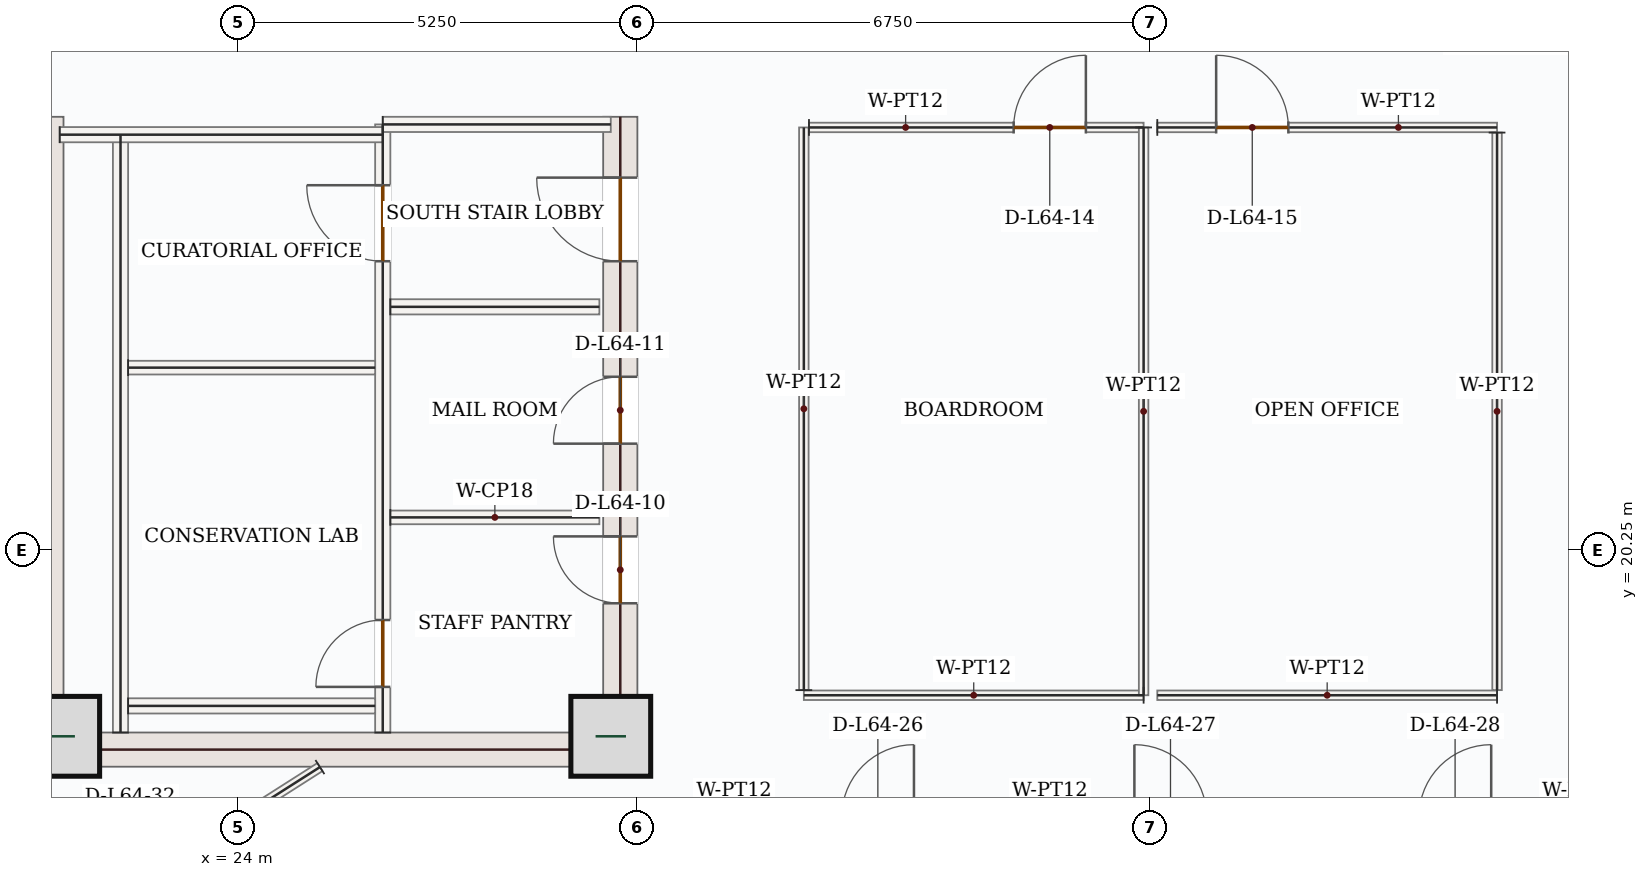
"""IFC4 building model, lengths in metres.
Left out: names, types, materials, properties, quantities, classifications, styles, units other than length and angle.
Written with IfcOpenShell. Run it as: python <this file> out.ifc"""

import sys

from ifc_helpers import new_model, si_unit, direction, frame, frame_2d, origin, origin_2d, place, context, subcontext, project, spatial, rectangle, extrude, source, transform, mapped, element, fill, save


model = new_model("IFC4")
c1 = context("Model", 3, precision=1e-05, world=origin(), true_north=direction((0.0, 1.0)))
c2 = subcontext(c1, "Body", "Model", "MODEL_VIEW")
j1 = project(units=[si_unit("LENGTHUNIT", "METRE"), si_unit("PLANEANGLEUNIT", "RADIAN")], contexts=[c1])
p1 = place(None, origin())
s1 = spatial("IfcSite", under=j1, at=p1, CompositionType="ELEMENT")
p2 = place(p1, origin())
s2 = spatial("IfcBuilding", under=s1, at=p2, CompositionType="ELEMENT")
p3 = place(p2, frame((0.0, 0.0, 269.1)))
s3 = spatial("IfcBuildingStorey", under=s2, at=p3, CompositionType="ELEMENT", Elevation=269.1)
m1 = source(origin(), c2, "Body", "SweptSolid", [
    extrude(rectangle(XDim=8.55, YDim=0.45, at=frame_2d((4.275, 0.0))), origin(), (0.0, 0.0, 1.0), 3.5),
])
p4 = place(p3, frame((21.475, 17.4, 0.0), z_axis=(0.0, 0.0, 1.0), x_axis=(0.0, 1.0, 0.0)))
e1 = element("IfcWall", 1, at=p4, inside=s3, PredefinedType="SHEAR", context=c2, shape_type="MappedRepresentation", body=[
    mapped(m1, transform((0.0, 0.0, 0.0), x_axis=(1.0, 0.0, 0.0), y_axis=(0.0, 1.0, 0.0), z_axis=(0.0, 0.0, 1.0), scale=1.0)),
])
p5 = place(p3, frame((29.025, 17.4, 0.0), z_axis=(0.0, 0.0, 1.0), x_axis=(0.0, 1.0, 0.0)))
e2 = element("IfcWall", 2, at=p5, inside=s3, PredefinedType="SHEAR", context=c2, shape_type="SweptSolid", body=[
    extrude(rectangle(XDim=8.55, YDim=0.45, at=frame_2d((4.275, 0.0))), origin(), (0.0, 0.0, 1.0), 3.5),
])
p6 = place(p5, frame((6.65, 0.0, 0.0)))
e3 = element("IfcOpeningElement", 3, at=p6, cuts=e2, PredefinedType="OPENING", context=c2, shape_type="SweptSolid", body=[
    extrude(rectangle(XDim=1.1, YDim=2.2, at=frame_2d((0.55, 1.1))), frame((0.0, 0.235, 0.0), z_axis=(0.0, -1.0, 0.0), x_axis=(1.0, 0.0, 0.0)), (0.0, 0.0, 1.0), 0.47),
])
p7 = place(p5, frame((2.15, 0.0, 0.0)))
e4 = element("IfcOpeningElement", 4, at=p7, cuts=e2, PredefinedType="OPENING", context=c2, shape_type="SweptSolid", body=[
    extrude(rectangle(XDim=0.88, YDim=2.1, at=frame_2d((0.44, 1.05))), frame((0.0, 0.235, 0.0), z_axis=(0.0, -1.0, 0.0), x_axis=(1.0, 0.0, 0.0)), (0.0, 0.0, 1.0), 0.47),
])
p8 = place(p5, frame((4.25, 0.0, 0.0)))
e5 = element("IfcOpeningElement", 5, at=p8, cuts=e2, PredefinedType="OPENING", context=c2, shape_type="SweptSolid", body=[
    extrude(rectangle(XDim=0.88, YDim=2.1, at=frame_2d((0.44, 1.05))), frame((0.0, 0.235, 0.0), z_axis=(0.0, -1.0, 0.0), x_axis=(1.0, 0.0, 0.0)), (0.0, 0.0, 1.0), 0.47),
])
m2 = source(origin(), c2, "Body", "SweptSolid", [
    extrude(rectangle(XDim=7.1, YDim=0.45, at=frame_2d((3.55, 0.0))), origin(), (0.0, 0.0, 1.0), 3.5),
])
p9 = place(p3, frame((21.7, 17.625, 0.0), z_axis=(0.0, 0.0, 1.0), x_axis=(1.0, 0.0, 0.0)))
e6 = element("IfcWall", 6, at=p9, inside=s3, PredefinedType="SHEAR", context=c2, shape_type="MappedRepresentation", body=[
    mapped(m2, transform((0.0, 0.0, 0.0), x_axis=(1.0, 0.0, 0.0), y_axis=(0.0, 1.0, 0.0), z_axis=(0.0, 0.0, 1.0), scale=1.0)),
])
m3 = source(origin(), c2, "Body", "SweptSolid", [
    extrude(rectangle(XDim=1.05, YDim=1.05, at=origin_2d()), origin(), (0.0, 0.0, 1.0), 3.75),
])
for number, where, z_axis, x_axis in (
    (7, (21.65, 17.8, 0.0), (0.0, 0.0, 1.0), (1.0, 0.0, 0.0)),
    (8, (28.9, 17.8, 0.0), (0.0, 0.0, 1.0), (1.0, 0.0, 0.0)),
):
    element("IfcColumn", number, at=place(p3, frame(where, z_axis=z_axis, x_axis=x_axis)), inside=s3, PredefinedType="COLUMN", context=c2, shape_type="MappedRepresentation", body=[
        mapped(m3, transform((0.0, 0.0, 0.0), x_axis=(1.0, 0.0, 0.0), y_axis=(0.0, 1.0, 0.0), z_axis=(0.0, 0.0, 1.0), scale=1.0)),
    ])
m4 = source(origin(), c2, "Body", "SweptSolid", [
    extrude(rectangle(XDim=7.87, YDim=0.2, at=frame_2d((3.935, 0.0))), origin(), (0.0, 0.0, 1.0), 3.5),
])
p10 = place(p3, frame((22.45, 17.85, 0.0), z_axis=(0.0, 0.0, 1.0), x_axis=(0.0, 1.0, 0.0)))
e9 = element("IfcWall", 9, at=p10, inside=s3, PredefinedType="SOLIDWALL", context=c2, shape_type="MappedRepresentation", body=[
    mapped(m4, transform((0.0, 0.0, 0.0), x_axis=(1.0, 0.0, 0.0), y_axis=(0.0, 1.0, 0.0), z_axis=(0.0, 0.0, 1.0), scale=1.0)),
])
p11 = place(p3, frame((25.9, 17.85, 0.0), z_axis=(0.0, 0.0, 1.0), x_axis=(0.0, 1.0, 0.0)))
e10 = element("IfcWall", 10, at=p11, inside=s3, PredefinedType="SOLIDWALL", context=c2, shape_type="SweptSolid", body=[
    extrude(rectangle(XDim=8.0, YDim=0.2, at=frame_2d((4.0, 0.0))), origin(), (0.0, 0.0, 1.0), 3.5),
])
p12 = place(p11, frame((6.2, 0.0, 0.0)))
e11 = element("IfcOpeningElement", 11, at=p12, cuts=e10, PredefinedType="OPENING", context=c2, shape_type="SweptSolid", body=[
    extrude(rectangle(XDim=1.0, YDim=2.15, at=frame_2d((0.5, 1.075))), frame((0.0, 0.11, 0.0), z_axis=(0.0, -1.0, 0.0), x_axis=(1.0, 0.0, 0.0)), (0.0, 0.0, 1.0), 0.22),
])
p13 = place(p11, frame((0.6, 0.0, 0.0)))
e12 = element("IfcOpeningElement", 12, at=p13, cuts=e10, PredefinedType="OPENING", context=c2, shape_type="SweptSolid", body=[
    extrude(rectangle(XDim=0.88, YDim=2.1, at=frame_2d((0.44, 1.05))), frame((0.0, 0.11, 0.0), z_axis=(0.0, -1.0, 0.0), x_axis=(1.0, 0.0, 0.0)), (0.0, 0.0, 1.0), 0.22),
])
m5 = source(origin(), c2, "Body", "SweptSolid", [
    extrude(rectangle(XDim=4.25, YDim=0.2, at=frame_2d((2.125, 0.0))), origin(), (0.0, 0.0, 1.0), 3.5),
])
p14 = place(p3, frame((21.65, 25.715, 0.0), z_axis=(0.0, 0.0, 1.0), x_axis=(1.0, 0.0, 0.0)))
e13 = element("IfcWall", 13, at=p14, inside=s3, PredefinedType="SOLIDWALL", context=c2, shape_type="MappedRepresentation", body=[
    mapped(m5, transform((0.0, 0.0, 0.0), x_axis=(1.0, 0.0, 0.0), y_axis=(0.0, 1.0, 0.0), z_axis=(0.0, 0.0, 1.0), scale=1.0)),
])
m6 = source(origin(), c2, "Body", "SweptSolid", [
    extrude(rectangle(XDim=3.0, YDim=0.2, at=frame_2d((1.5, 0.0))), origin(), (0.0, 0.0, 1.0), 3.5),
])
p15 = place(p3, frame((25.9, 25.85, 0.0), z_axis=(0.0, 0.0, 1.0), x_axis=(1.0, 0.0, 0.0)))
e14 = element("IfcWall", 14, at=p15, inside=s3, PredefinedType="SOLIDWALL", context=c2, shape_type="MappedRepresentation", body=[
    mapped(m6, transform((0.0, 0.0, 0.0), x_axis=(1.0, 0.0, 0.0), y_axis=(0.0, 1.0, 0.0), z_axis=(0.0, 0.0, 1.0), scale=1.0)),
])
m7 = source(origin(), c2, "Body", "SweptSolid", [
    extrude(rectangle(XDim=3.25, YDim=0.2, at=frame_2d((1.625, 0.0))), origin(), (0.0, 0.0, 1.0), 3.5),
])
p16 = place(p3, frame((22.55, 18.2, 0.0), z_axis=(0.0, 0.0, 1.0), x_axis=(1.0, 0.0, 0.0)))
e15 = element("IfcWall", 15, at=p16, inside=s3, PredefinedType="SOLIDWALL", context=c2, shape_type="MappedRepresentation", body=[
    mapped(m7, transform((0.0, 0.0, 0.0), x_axis=(1.0, 0.0, 0.0), y_axis=(0.0, 1.0, 0.0), z_axis=(0.0, 0.0, 1.0), scale=1.0)),
])
m8 = source(origin(), c2, "Body", "SweptSolid", [
    extrude(rectangle(XDim=3.25, YDim=0.18, at=frame_2d((1.625, 0.0))), origin(), (0.0, 0.0, 1.0), 3.5),
])
p17 = place(p3, frame((22.55, 22.65, 0.0), z_axis=(0.0, 0.0, 1.0), x_axis=(1.0, 0.0, 0.0)))
e16 = element("IfcWall", 16, at=p17, inside=s3, PredefinedType="PARTITIONING", context=c2, shape_type="MappedRepresentation", body=[
    mapped(m8, transform((0.0, 0.0, 0.0), x_axis=(1.0, 0.0, 0.0), y_axis=(0.0, 1.0, 0.0), z_axis=(0.0, 0.0, 1.0), scale=1.0)),
])
m9 = source(origin(), c2, "Body", "SweptSolid", [
    extrude(rectangle(XDim=2.75, YDim=0.2, at=frame_2d((1.375, 0.0))), origin(), (0.0, 0.0, 1.0), 3.5),
])
p18 = place(p3, frame((26.0, 23.45, 0.0), z_axis=(0.0, 0.0, 1.0), x_axis=(1.0, 0.0, 0.0)))
e17 = element("IfcWall", 17, at=p18, inside=s3, PredefinedType="SOLIDWALL", context=c2, shape_type="MappedRepresentation", body=[
    mapped(m9, transform((0.0, 0.0, 0.0), x_axis=(1.0, 0.0, 0.0), y_axis=(0.0, 1.0, 0.0), z_axis=(0.0, 0.0, 1.0), scale=1.0)),
])
m10 = source(origin(), c2, "Body", "SweptSolid", [
    extrude(rectangle(XDim=2.75, YDim=0.18, at=frame_2d((1.375, 0.0))), origin(), (0.0, 0.0, 1.0), 3.5),
])
p19 = place(p3, frame((26.0, 20.68, 0.0), z_axis=(0.0, 0.0, 1.0), x_axis=(1.0, 0.0, 0.0)))
e18 = element("IfcWall", 18, at=p19, inside=s3, PredefinedType="PARTITIONING", context=c2, shape_type="MappedRepresentation", body=[
    mapped(m10, transform((0.0, 0.0, 0.0), x_axis=(1.0, 0.0, 0.0), y_axis=(0.0, 1.0, 0.0), z_axis=(0.0, 0.0, 1.0), scale=1.0)),
])
p20 = place(p3, frame((25.073, 17.395, 0.0), z_axis=(0.0, 0.0, 1.0), x_axis=(-0.843398332862, -0.537288797693, 0.0)))
e19 = element("IfcWall", 19, at=p20, inside=s3, PredefinedType="PARTITIONING", context=c2, shape_type="SweptSolid", body=[
    extrude(rectangle(XDim=5.924, YDim=0.125, at=frame_2d((2.962, 0.0))), origin(), (0.0, 0.0, 1.0), 3.5),
])
p21 = place(p20, frame((2.487, 0.0, 0.0)))
e20 = element("IfcOpeningElement", 20, at=p21, cuts=e19, PredefinedType="OPENING", context=c2, shape_type="SweptSolid", body=[
    extrude(rectangle(XDim=0.95, YDim=2.15, at=frame_2d((0.475, 1.075))), frame((0.0, 0.073, 0.0), z_axis=(0.0, -1.0, 0.0), x_axis=(1.0, 0.0, 0.0)), (0.0, 0.0, 1.0), 0.145),
])
m11 = source(origin(), c2, "Body", "SweptSolid", [
    extrude(rectangle(XDim=4.47, YDim=0.125, at=frame_2d((2.235, 0.0))), origin(), (0.0, 0.0, 1.0), 3.5),
])
p22 = place(p3, frame((35.91, 18.34, 0.0), z_axis=(0.0, 0.0, 1.0), x_axis=(-1.0, 0.0, 0.0)))
e21 = element("IfcWall", 21, at=p22, inside=s3, PredefinedType="PARTITIONING", context=c2, shape_type="MappedRepresentation", body=[
    mapped(m11, transform((0.0, 0.0, 0.0), x_axis=(1.0, 0.0, 0.0), y_axis=(0.0, 1.0, 0.0), z_axis=(0.0, 0.0, 1.0), scale=1.0)),
])
m12 = source(origin(), c2, "Body", "SweptSolid", [
    extrude(rectangle(XDim=7.403, YDim=0.125, at=frame_2d((3.701, 0.0))), origin(), (0.0, 0.0, 1.0), 3.5),
])
p23 = place(p3, frame((31.44, 18.407, 0.0), z_axis=(0.0, 0.0, 1.0), x_axis=(0.0, 1.0, 0.0)))
e22 = element("IfcWall", 22, at=p23, inside=s3, PredefinedType="PARTITIONING", context=c2, shape_type="MappedRepresentation", body=[
    mapped(m12, transform((0.0, 0.0, 0.0), x_axis=(1.0, 0.0, 0.0), y_axis=(0.0, 1.0, 0.0), z_axis=(0.0, 0.0, 1.0), scale=1.0)),
])
p24 = place(p3, frame((31.508, 25.81, 0.0), z_axis=(0.0, 0.0, 1.0), x_axis=(1.0, 0.0, 0.0)))
e23 = element("IfcWall", 23, at=p24, inside=s3, PredefinedType="PARTITIONING", context=c2, shape_type="SweptSolid", body=[
    extrude(rectangle(XDim=4.402, YDim=0.125, at=frame_2d((2.201, 0.0))), origin(), (0.0, 0.0, 1.0), 3.5),
])
p25 = place(p24, frame((2.693, 0.0, 0.0)))
e24 = element("IfcOpeningElement", 24, at=p25, cuts=e23, PredefinedType="OPENING", context=c2, shape_type="SweptSolid", body=[
    extrude(rectangle(XDim=0.95, YDim=2.15, at=frame_2d((0.475, 1.075))), frame((0.0, 0.073, 0.0), z_axis=(0.0, -1.0, 0.0), x_axis=(1.0, 0.0, 0.0)), (0.0, 0.0, 1.0), 0.145),
])
m13 = source(origin(), c2, "Body", "SweptSolid", [
    extrude(rectangle(XDim=7.47, YDim=0.125, at=frame_2d((3.735, 0.0))), origin(), (0.0, 0.0, 1.0), 3.5),
])
p26 = place(p3, frame((35.91, 25.81, 0.0), z_axis=(0.0, 0.0, 1.0), x_axis=(0.0, -1.0, 0.0)))
e25 = element("IfcWall", 25, at=p26, inside=s3, PredefinedType="PARTITIONING", context=c2, shape_type="MappedRepresentation", body=[
    mapped(m13, transform((0.0, 0.0, 0.0), x_axis=(1.0, 0.0, 0.0), y_axis=(0.0, 1.0, 0.0), z_axis=(0.0, 0.0, 1.0), scale=1.0)),
])
p27 = place(p3, frame((40.56, 18.34, 0.0), z_axis=(0.0, 0.0, 1.0), x_axis=(-1.0, 0.0, 0.0)))
e26 = element("IfcWall", 26, at=p27, inside=s3, PredefinedType="PARTITIONING", context=c2, shape_type="MappedRepresentation", body=[
    mapped(m11, transform((0.0, 0.0, 0.0), x_axis=(1.0, 0.0, 0.0), y_axis=(0.0, 1.0, 0.0), z_axis=(0.0, 0.0, 1.0), scale=1.0)),
])
p28 = place(p3, frame((36.09, 25.81, 0.0), z_axis=(0.0, 0.0, 1.0), x_axis=(1.0, 0.0, 0.0)))
e27 = element("IfcWall", 27, at=p28, inside=s3, PredefinedType="PARTITIONING", context=c2, shape_type="SweptSolid", body=[
    extrude(rectangle(XDim=4.47, YDim=0.125, at=frame_2d((2.235, 0.0))), origin(), (0.0, 0.0, 1.0), 3.5),
])
p29 = place(p28, frame((0.774, 0.0, 0.0)))
e28 = element("IfcOpeningElement", 28, at=p29, cuts=e27, PredefinedType="OPENING", context=c2, shape_type="SweptSolid", body=[
    extrude(rectangle(XDim=0.95, YDim=2.15, at=frame_2d((0.475, 1.075))), frame((0.0, 0.073, 0.0), z_axis=(0.0, -1.0, 0.0), x_axis=(1.0, 0.0, 0.0)), (0.0, 0.0, 1.0), 0.145),
])
m14 = source(origin(), c2, "Body", "SweptSolid", [
    extrude(rectangle(XDim=7.335, YDim=0.125, at=frame_2d((3.667, 0.0))), origin(), (0.0, 0.0, 1.0), 3.5),
])
p30 = place(p3, frame((40.56, 25.742, 0.0), z_axis=(0.0, 0.0, 1.0), x_axis=(0.0, -1.0, 0.0)))
e29 = element("IfcWall", 29, at=p30, inside=s3, PredefinedType="PARTITIONING", context=c2, shape_type="MappedRepresentation", body=[
    mapped(m14, transform((0.0, 0.0, 0.0), x_axis=(1.0, 0.0, 0.0), y_axis=(0.0, 1.0, 0.0), z_axis=(0.0, 0.0, 1.0), scale=1.0)),
])
m15 = source(origin(), c2, "Body", "SweptSolid", [
    extrude(rectangle(XDim=1.0, YDim=2.15, at=frame_2d((0.5, 1.075))), frame((0.0, 0.025, 0.0), z_axis=(0.0, -1.0, 0.0), x_axis=(1.0, 0.0, 0.0)), (0.0, 0.0, 1.0), 0.05),
])
p31 = place(p12, origin())
e30 = element("IfcDoor", 30, at=p31, inside=s3, OperationType="SINGLE_SWING_RIGHT", PredefinedType="DOOR", context=c2, shape_type="MappedRepresentation", body=[
    mapped(m15, transform((0.0, 0.0, 0.0), x_axis=(1.0, 0.0, 0.0), y_axis=(0.0, 1.0, 0.0), z_axis=(0.0, 0.0, 1.0), scale=1.0)),
])
fill(e11, e30)
m16 = source(origin(), c2, "Body", "SweptSolid", [
    extrude(rectangle(XDim=0.88, YDim=2.1, at=frame_2d((0.44, 1.05))), frame((0.0, 0.025, 0.0), z_axis=(0.0, -1.0, 0.0), x_axis=(1.0, 0.0, 0.0)), (0.0, 0.0, 1.0), 0.05),
])
p32 = place(p13, origin())
e31 = element("IfcDoor", 31, at=p32, inside=s3, OperationType="SINGLE_SWING_LEFT", PredefinedType="DOOR", context=c2, shape_type="MappedRepresentation", body=[
    mapped(m16, transform((0.0, 0.0, 0.0), x_axis=(1.0, 0.0, 0.0), y_axis=(0.0, 1.0, 0.0), z_axis=(0.0, 0.0, 1.0), scale=1.0)),
])
fill(e12, e31)
m17 = source(origin(), c2, "Body", "SweptSolid", [
    extrude(rectangle(XDim=1.1, YDim=2.2, at=frame_2d((0.55, 1.1))), frame((0.0, 0.025, 0.0), z_axis=(0.0, -1.0, 0.0), x_axis=(1.0, 0.0, 0.0)), (0.0, 0.0, 1.0), 0.05),
])
p33 = place(p6, origin())
e32 = element("IfcDoor", 32, at=p33, inside=s3, OperationType="SINGLE_SWING_RIGHT", PredefinedType="DOOR", context=c2, shape_type="MappedRepresentation", body=[
    mapped(m17, transform((0.0, 0.0, 0.0), x_axis=(1.0, 0.0, 0.0), y_axis=(0.0, 1.0, 0.0), z_axis=(0.0, 0.0, 1.0), scale=1.0)),
])
fill(e3, e32)
p34 = place(p7, origin())
e33 = element("IfcDoor", 33, at=p34, inside=s3, OperationType="SINGLE_SWING_RIGHT", PredefinedType="DOOR", context=c2, shape_type="MappedRepresentation", body=[
    mapped(m16, transform((0.0, 0.0, 0.0), x_axis=(1.0, 0.0, 0.0), y_axis=(0.0, 1.0, 0.0), z_axis=(0.0, 0.0, 1.0), scale=1.0)),
])
fill(e4, e33)
p35 = place(p8, origin())
e34 = element("IfcDoor", 34, at=p35, inside=s3, OperationType="SINGLE_SWING_LEFT", PredefinedType="DOOR", context=c2, shape_type="MappedRepresentation", body=[
    mapped(m16, transform((0.0, 0.0, 0.0), x_axis=(1.0, 0.0, 0.0), y_axis=(0.0, 1.0, 0.0), z_axis=(0.0, 0.0, 1.0), scale=1.0)),
])
fill(e5, e34)
m18 = source(origin(), c2, "Body", "SweptSolid", [
    extrude(rectangle(XDim=0.95, YDim=2.15, at=frame_2d((0.475, 1.075))), frame((0.0, 0.025, 0.0), z_axis=(0.0, -1.0, 0.0), x_axis=(1.0, 0.0, 0.0)), (0.0, 0.0, 1.0), 0.05),
])
p36 = place(p25, origin())
e35 = element("IfcDoor", 35, at=p36, inside=s3, OperationType="SINGLE_SWING_RIGHT", PredefinedType="DOOR", context=c2, shape_type="MappedRepresentation", body=[
    mapped(m18, transform((0.0, 0.0, 0.0), x_axis=(1.0, 0.0, 0.0), y_axis=(0.0, 1.0, 0.0), z_axis=(0.0, 0.0, 1.0), scale=1.0)),
])
fill(e24, e35)
p37 = place(p29, origin())
e36 = element("IfcDoor", 36, at=p37, inside=s3, OperationType="SINGLE_SWING_LEFT", PredefinedType="DOOR", context=c2, shape_type="MappedRepresentation", body=[
    mapped(m18, transform((0.0, 0.0, 0.0), x_axis=(1.0, 0.0, 0.0), y_axis=(0.0, 1.0, 0.0), z_axis=(0.0, 0.0, 1.0), scale=1.0)),
])
fill(e28, e36)
save(model, sys.argv[1])
